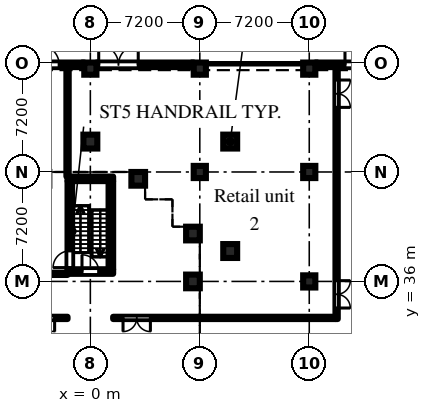
"""IFC4 building model, lengths in metres.
Left out: names, types, materials, properties, quantities, classifications, styles, units other than length and angle.
Written with IfcOpenShell. Run it as: python <this file> out.ifc"""

import sys

from ifc_helpers import new_model, si_unit, direction, frame, frame_2d, origin, origin_2d, place, context, subcontext, project, spatial, rectangle, hollow_circle, extrude, element, fill, save


model = new_model("IFC4")
c1 = context("Model", 3, precision=1e-05, world=origin(), true_north=direction((0.0, 1.0)))
c2 = subcontext(c1, "Body", "Model", "MODEL_VIEW")
j1 = project(units=[si_unit("LENGTHUNIT", "METRE"), si_unit("PLANEANGLEUNIT", "RADIAN")], contexts=[c1])
p1 = place(None, origin())
s1 = spatial("IfcSite", under=j1, at=p1, CompositionType="ELEMENT")
p2 = place(p1, origin())
s2 = spatial("IfcBuilding", under=s1, at=p2, CompositionType="ELEMENT")
p3 = place(p2, origin())
s3 = spatial("IfcBuildingStorey", under=s2, at=p3, CompositionType="ELEMENT", Elevation=0.0)
for number, where, z_axis, x_axis in (
    (1, (3.15, 42.75, 0.0), (0.0, 0.0, 1.0), (1.0, 0.0, 0.0)),
    (2, (6.75, 36.0, 0.0), (0.0, 0.0, 1.0), (1.0, 0.0, 0.0)),
    (3, (6.75, 39.15, 0.0), (0.0, 0.0, 1.0), (1.0, 0.0, 0.0)),
):
    element("IfcColumn", number, at=place(p3, frame(where, z_axis=z_axis, x_axis=x_axis)), inside=s3, PredefinedType="COLUMN", context=c2, shape_type="SweptSolid", body=[
        extrude(rectangle(XDim=0.9, YDim=0.9, at=origin_2d()), origin(), (0.0, 0.0, 1.0), 7.2),
    ])
for number, where, z_axis, x_axis in (
    (4, (0.0, 50.0, 0.0), (0.0, 0.0, 1.0), (1.0, 0.0, 0.0)),
    (5, (7.2, 43.2, 0.0), (0.0, 0.0, 1.0), (1.0, 0.0, 0.0)),
    (6, (7.2, 50.0, 0.0), (0.0, 0.0, 1.0), (1.0, 0.0, 0.0)),
    (7, (14.4, 36.0, 0.0), (0.0, 0.0, 1.0), (1.0, 0.0, 0.0)),
    (8, (14.4, 43.2, 0.0), (0.0, 0.0, 1.0), (1.0, 0.0, 0.0)),
    (9, (14.4, 50.0, 0.0), (0.0, 0.0, 1.0), (1.0, 0.0, 0.0)),
):
    element("IfcColumn", number, at=place(p3, frame(where, z_axis=z_axis, x_axis=x_axis)), inside=s3, PredefinedType="COLUMN", context=c2, shape_type="SweptSolid", body=[
        extrude(rectangle(XDim=0.8, YDim=0.8, at=origin_2d()), origin(), (0.0, 0.0, 1.0), 6.6),
    ])
for number, where, z_axis, x_axis in (
    (10, (9.2, 38.0, 0.0), (0.0, 0.0, 1.0), (1.0, 0.0, 0.0)),
    (11, (9.2, 45.2, 0.0), (0.0, 0.0, 1.0), (1.0, 0.0, 0.0)),
    (12, (0.0, 45.2, 0.0), (0.0, 0.0, 1.0), (1.0, 0.0, 0.0)),
):
    element("IfcColumn", number, at=place(p3, frame(where, z_axis=z_axis, x_axis=x_axis)), inside=s3, PredefinedType="COLUMN", context=c2, shape_type="SweptSolid", body=[
        extrude(hollow_circle(Radius=0.457, WallThickness=0.05, at=origin_2d()), origin(), (0.0, 0.0, 1.0), 7.5),
    ])
p4 = place(p3, frame((21.2, 50.25, 0.0), z_axis=(0.0, 0.0, 1.0), x_axis=(-1.0, 0.0, 0.0)))
e13 = element("IfcWall", 13, at=p4, inside=s3, PredefinedType="SOLIDWALL", context=c2, shape_type="SweptSolid", body=[
    extrude(rectangle(XDim=6.4, YDim=0.3, at=frame_2d((3.2, 0.0))), origin(), (0.0, 0.0, 1.0), 6.6),
])
p5 = place(p4, frame((3.15, 0.0, 0.0)))
e14 = element("IfcOpeningElement", 14, at=p5, cuts=e13, PredefinedType="OPENING", context=c2, shape_type="SweptSolid", body=[
    extrude(rectangle(XDim=1.3, YDim=2.1, at=frame_2d((0.65, 1.05))), frame((0.0, 0.16, 0.0), z_axis=(0.0, -1.0, 0.0), x_axis=(1.0, 0.0, 0.0)), (0.0, 0.0, 1.0), 0.32),
])
p6 = place(p3, frame((6.8, 50.25, 0.0), z_axis=(0.0, 0.0, 1.0), x_axis=(-1.0, 0.0, 0.0)))
e15 = element("IfcWall", 15, at=p6, inside=s3, PredefinedType="SOLIDWALL", context=c2, shape_type="SweptSolid", body=[
    extrude(rectangle(XDim=6.4, YDim=0.3, at=frame_2d((3.2, 0.0))), origin(), (0.0, 0.0, 1.0), 6.6),
])
p7 = place(p6, frame((3.65, 0.0, 0.0)))
e16 = element("IfcOpeningElement", 16, at=p7, cuts=e15, PredefinedType="OPENING", context=c2, shape_type="SweptSolid", body=[
    extrude(rectangle(XDim=2.6, YDim=2.4, at=frame_2d((1.3, 1.2))), frame((0.0, 0.16, 0.0), z_axis=(0.0, -1.0, 0.0), x_axis=(1.0, 0.0, 0.0)), (0.0, 0.0, 1.0), 0.32),
])
p8 = place(p3, frame((-0.4, 50.25, 0.0), z_axis=(0.0, 0.0, 1.0), x_axis=(-1.0, 0.0, 0.0)))
e17 = element("IfcWall", 17, at=p8, inside=s3, PredefinedType="SOLIDWALL", context=c2, shape_type="SweptSolid", body=[
    extrude(rectangle(XDim=6.4, YDim=0.3, at=frame_2d((3.2, 0.0))), origin(), (0.0, 0.0, 1.0), 6.6),
])
p9 = place(p8, frame((1.65, 0.0, 0.0)))
e18 = element("IfcOpeningElement", 18, at=p9, cuts=e17, PredefinedType="OPENING", context=c2, shape_type="SweptSolid", body=[
    extrude(rectangle(XDim=1.3, YDim=2.1, at=frame_2d((0.65, 1.05))), frame((0.0, 0.16, 0.0), z_axis=(0.0, -1.0, 0.0), x_axis=(1.0, 0.0, 0.0)), (0.0, 0.0, 1.0), 0.32),
])
p10 = place(p8, frame((3.65, 0.0, 0.0)))
e19 = element("IfcOpeningElement", 19, at=p10, cuts=e17, PredefinedType="OPENING", context=c2, shape_type="SweptSolid", body=[
    extrude(rectangle(XDim=2.6, YDim=2.4, at=frame_2d((1.3, 1.2))), frame((0.0, 0.16, 0.0), z_axis=(0.0, -1.0, 0.0), x_axis=(1.0, 0.0, 0.0)), (0.0, 0.0, 1.0), 0.32),
])
p11 = place(p3, frame((-1.5, 36.65, 0.0), z_axis=(0.0, 0.0, 1.0), x_axis=(1.0, 0.0, 0.0)))
e20 = element("IfcWall", 20, at=p11, inside=s3, PredefinedType="SHEAR", context=c2, shape_type="SweptSolid", body=[
    extrude(rectangle(XDim=3.0, YDim=0.3, at=frame_2d((1.5, 0.0))), origin(), (0.0, 0.0, 1.0), 6.6),
])
p12 = place(p11, frame((0.95, 0.0, 0.0)))
e21 = element("IfcOpeningElement", 21, at=p12, cuts=e20, PredefinedType="OPENING", context=c2, shape_type="SweptSolid", body=[
    extrude(rectangle(XDim=1.1, YDim=2.1, at=frame_2d((0.55, 1.05))), frame((0.0, 0.16, 0.0), z_axis=(0.0, -1.0, 0.0), x_axis=(1.0, 0.0, 0.0)), (0.0, 0.0, 1.0), 0.32),
])
p13 = place(p3, frame((-1.5, 42.75, 0.0), z_axis=(0.0, 0.0, 1.0), x_axis=(1.0, 0.0, 0.0)))
e22 = element("IfcWall", 22, at=p13, inside=s3, PredefinedType="SHEAR", context=c2, shape_type="SweptSolid", body=[
    extrude(rectangle(XDim=3.0, YDim=0.3, at=frame_2d((1.5, 0.0))), origin(), (0.0, 0.0, 1.0), 6.6),
])
p14 = place(p3, frame((-1.35, 36.8, 0.0), z_axis=(0.0, 0.0, 1.0), x_axis=(0.0, 1.0, 0.0)))
e23 = element("IfcWall", 23, at=p14, inside=s3, PredefinedType="SHEAR", context=c2, shape_type="SweptSolid", body=[
    extrude(rectangle(XDim=5.8, YDim=0.3, at=frame_2d((2.9, 0.0))), origin(), (0.0, 0.0, 1.0), 6.6),
])
p15 = place(p14, frame((0.11, 0.0, 0.0)))
e24 = element("IfcOpeningElement", 24, at=p15, cuts=e23, PredefinedType="OPENING", context=c2, shape_type="SweptSolid", body=[
    extrude(rectangle(XDim=1.1, YDim=2.1, at=frame_2d((0.55, 1.05))), frame((0.0, 0.16, 0.0), z_axis=(0.0, -1.0, 0.0), x_axis=(1.0, 0.0, 0.0)), (0.0, 0.0, 1.0), 0.32),
])
p16 = place(p3, frame((1.35, 36.8, 0.0), z_axis=(0.0, 0.0, 1.0), x_axis=(0.0, 1.0, 0.0)))
e25 = element("IfcWall", 25, at=p16, inside=s3, PredefinedType="SHEAR", context=c2, shape_type="SweptSolid", body=[
    extrude(rectangle(XDim=5.8, YDim=0.3, at=frame_2d((2.9, 0.0))), origin(), (0.0, 0.0, 1.0), 6.6),
])
p17 = place(p3, frame((-16.125, 33.6, 0.0), z_axis=(0.0, 0.0, 1.0), x_axis=(1.0, 0.0, 0.0)))
e26 = element("IfcWall", 26, at=p17, inside=s3, PredefinedType="PARTITIONING", context=c2, shape_type="SweptSolid", body=[
    extrude(rectangle(XDim=14.625, YDim=0.15, at=frame_2d((7.312, 0.0))), origin(), (0.0, 0.0, 1.0), 6.6),
])
p18 = place(p17, frame((0.575, 0.0, 0.0)))
e27 = element("IfcOpeningElement", 27, at=p18, cuts=e26, PredefinedType="OPENING", context=c2, shape_type="SweptSolid", body=[
    extrude(rectangle(XDim=1.8, YDim=2.1, at=frame_2d((0.9, 1.05))), frame((0.0, 0.085, 0.0), z_axis=(0.0, -1.0, 0.0), x_axis=(1.0, 0.0, 0.0)), (0.0, 0.0, 1.0), 0.17),
])
p19 = place(p17, frame((11.975, 0.0, 0.0)))
e28 = element("IfcOpeningElement", 28, at=p19, cuts=e26, PredefinedType="OPENING", context=c2, shape_type="SweptSolid", body=[
    extrude(rectangle(XDim=1.8, YDim=2.1, at=frame_2d((0.9, 1.05))), frame((0.0, 0.085, 0.0), z_axis=(0.0, -1.0, 0.0), x_axis=(1.0, 0.0, 0.0)), (0.0, 0.0, 1.0), 0.17),
])
p20 = place(p3, frame((-3.825, 36.5, 0.0), z_axis=(0.0, 0.0, 1.0), x_axis=(1.0, 0.0, 0.0)))
e29 = element("IfcWall", 29, at=p20, inside=s3, PredefinedType="PARTITIONING", context=c2, shape_type="SweptSolid", body=[
    extrude(rectangle(XDim=2.325, YDim=0.15, at=frame_2d((1.163, 0.0))), origin(), (0.0, 0.0, 1.0), 6.6),
])
p21 = place(p3, frame((-1.5, 42.9, 0.0), z_axis=(0.0, 0.0, 1.0), x_axis=(0.0, 1.0, 0.0)))
e30 = element("IfcWall", 30, at=p21, inside=s3, PredefinedType="PARTITIONING", context=c2, shape_type="SweptSolid", body=[
    extrude(rectangle(XDim=7.32, YDim=0.15, at=frame_2d((3.66, 0.0))), origin(), (0.0, 0.0, 1.0), 6.6),
])
p22 = place(p3, frame((1.5, 33.6, 0.0), z_axis=(0.0, 0.0, 1.0), x_axis=(1.0, 0.0, 0.0)))
e31 = element("IfcWall", 31, at=p22, inside=s3, PredefinedType="PARTITIONING", context=c2, shape_type="SweptSolid", body=[
    extrude(rectangle(XDim=14.625, YDim=0.15, at=frame_2d((7.312, 0.0))), origin(), (0.0, 0.0, 1.0), 6.6),
])
p23 = place(p22, frame((0.65, 0.0, 0.0)))
e32 = element("IfcOpeningElement", 32, at=p23, cuts=e31, PredefinedType="OPENING", context=c2, shape_type="SweptSolid", body=[
    extrude(rectangle(XDim=1.8, YDim=2.1, at=frame_2d((0.9, 1.05))), frame((0.0, 0.085, 0.0), z_axis=(0.0, -1.0, 0.0), x_axis=(1.0, 0.0, 0.0)), (0.0, 0.0, 1.0), 0.17),
])
p24 = place(p3, frame((16.2, 33.525, 0.0), z_axis=(0.0, 0.0, 1.0), x_axis=(0.0, 1.0, 0.0)))
e33 = element("IfcWall", 33, at=p24, inside=s3, PredefinedType="PARTITIONING", context=c2, shape_type="SweptSolid", body=[
    extrude(rectangle(XDim=16.695, YDim=0.15, at=frame_2d((8.348, 0.0))), origin(), (0.0, 0.0, 1.0), 6.6),
])
p25 = place(p24, frame((0.725, 0.0, 0.0)))
e34 = element("IfcOpeningElement", 34, at=p25, cuts=e33, PredefinedType="OPENING", context=c2, shape_type="SweptSolid", body=[
    extrude(rectangle(XDim=1.8, YDim=2.1, at=frame_2d((0.9, 1.05))), frame((0.0, 0.085, 0.0), z_axis=(0.0, -1.0, 0.0), x_axis=(1.0, 0.0, 0.0)), (0.0, 0.0, 1.0), 0.17),
])
p26 = place(p24, frame((13.925, 0.0, 0.0)))
e35 = element("IfcOpeningElement", 35, at=p26, cuts=e33, PredefinedType="OPENING", context=c2, shape_type="SweptSolid", body=[
    extrude(rectangle(XDim=1.8, YDim=2.1, at=frame_2d((0.9, 1.05))), frame((0.0, 0.085, 0.0), z_axis=(0.0, -1.0, 0.0), x_axis=(1.0, 0.0, 0.0)), (0.0, 0.0, 1.0), 0.17),
])
p27 = place(p5, frame((1.3, 0.0, 0.0), z_axis=(0.0, 0.0, 1.0), x_axis=(-1.0, 0.0, 0.0)))
e36 = element("IfcDoor", 36, at=p27, inside=s3, OperationType="SINGLE_SWING_LEFT", PredefinedType="DOOR", context=c2, shape_type="SweptSolid", body=[
    extrude(rectangle(XDim=1.3, YDim=2.1, at=frame_2d((0.65, 1.05))), frame((0.0, 0.025, 0.0), z_axis=(0.0, -1.0, 0.0), x_axis=(1.0, 0.0, 0.0)), (0.0, 0.0, 1.0), 0.05),
])
fill(e14, e36)
p28 = place(p7, frame((2.6, 0.0, 0.0), z_axis=(0.0, 0.0, 1.0), x_axis=(-1.0, 0.0, 0.0)))
e37 = element("IfcDoor", 37, at=p28, inside=s3, OperationType="DOUBLE_DOOR_DOUBLE_SWING", PredefinedType="DOOR", context=c2, shape_type="SweptSolid", body=[
    extrude(rectangle(XDim=2.6, YDim=2.4, at=frame_2d((1.3, 1.2))), frame((0.0, 0.025, 0.0), z_axis=(0.0, -1.0, 0.0), x_axis=(1.0, 0.0, 0.0)), (0.0, 0.0, 1.0), 0.05),
])
fill(e16, e37)
p29 = place(p9, frame((1.3, 0.0, 0.0), z_axis=(0.0, 0.0, 1.0), x_axis=(-1.0, 0.0, 0.0)))
e38 = element("IfcDoor", 38, at=p29, inside=s3, OperationType="SINGLE_SWING_LEFT", PredefinedType="DOOR", context=c2, shape_type="SweptSolid", body=[
    extrude(rectangle(XDim=1.3, YDim=2.1, at=frame_2d((0.65, 1.05))), frame((0.0, 0.025, 0.0), z_axis=(0.0, -1.0, 0.0), x_axis=(1.0, 0.0, 0.0)), (0.0, 0.0, 1.0), 0.05),
])
fill(e18, e38)
p30 = place(p12, origin())
e39 = element("IfcDoor", 39, at=p30, inside=s3, OperationType="SINGLE_SWING_LEFT", PredefinedType="DOOR", context=c2, shape_type="SweptSolid", body=[
    extrude(rectangle(XDim=1.1, YDim=2.1, at=frame_2d((0.55, 1.05))), frame((0.0, 0.025, 0.0), z_axis=(0.0, -1.0, 0.0), x_axis=(1.0, 0.0, 0.0)), (0.0, 0.0, 1.0), 0.05),
])
fill(e21, e39)
p31 = place(p15, origin())
e40 = element("IfcDoor", 40, at=p31, inside=s3, OperationType="SINGLE_SWING_LEFT", PredefinedType="DOOR", context=c2, shape_type="SweptSolid", body=[
    extrude(rectangle(XDim=1.1, YDim=2.1, at=frame_2d((0.55, 1.05))), frame((0.0, 0.025, 0.0), z_axis=(0.0, -1.0, 0.0), x_axis=(1.0, 0.0, 0.0)), (0.0, 0.0, 1.0), 0.05),
])
fill(e24, e40)
p32 = place(p23, frame((1.8, 0.0, 0.0), z_axis=(0.0, 0.0, 1.0), x_axis=(-1.0, 0.0, 0.0)))
e41 = element("IfcDoor", 41, at=p32, inside=s3, OperationType="DOUBLE_DOOR_DOUBLE_SWING", PredefinedType="DOOR", context=c2, shape_type="SweptSolid", body=[
    extrude(rectangle(XDim=1.8, YDim=2.1, at=frame_2d((0.9, 1.05))), frame((0.0, 0.025, 0.0), z_axis=(0.0, -1.0, 0.0), x_axis=(1.0, 0.0, 0.0)), (0.0, 0.0, 1.0), 0.05),
])
fill(e32, e41)
p33 = place(p25, frame((1.8, 0.0, 0.0), z_axis=(0.0, 0.0, 1.0), x_axis=(-1.0, 0.0, 0.0)))
e42 = element("IfcDoor", 42, at=p33, inside=s3, OperationType="DOUBLE_DOOR_DOUBLE_SWING", PredefinedType="DOOR", context=c2, shape_type="SweptSolid", body=[
    extrude(rectangle(XDim=1.8, YDim=2.1, at=frame_2d((0.9, 1.05))), frame((0.0, 0.025, 0.0), z_axis=(0.0, -1.0, 0.0), x_axis=(1.0, 0.0, 0.0)), (0.0, 0.0, 1.0), 0.05),
])
fill(e34, e42)
p34 = place(p26, frame((1.8, 0.0, 0.0), z_axis=(0.0, 0.0, 1.0), x_axis=(-1.0, 0.0, 0.0)))
e43 = element("IfcDoor", 43, at=p34, inside=s3, OperationType="DOUBLE_DOOR_DOUBLE_SWING", PredefinedType="DOOR", context=c2, shape_type="SweptSolid", body=[
    extrude(rectangle(XDim=1.8, YDim=2.1, at=frame_2d((0.9, 1.05))), frame((0.0, 0.025, 0.0), z_axis=(0.0, -1.0, 0.0), x_axis=(1.0, 0.0, 0.0)), (0.0, 0.0, 1.0), 0.05),
])
fill(e35, e43)
p35 = place(p19, frame((1.8, 0.0, 0.0), z_axis=(0.0, 0.0, 1.0), x_axis=(-1.0, 0.0, 0.0)))
e44 = element("IfcDoor", 44, at=p35, inside=s3, OperationType="DOUBLE_DOOR_DOUBLE_SWING", PredefinedType="DOOR", context=c2, shape_type="SweptSolid", body=[
    extrude(rectangle(XDim=1.8, YDim=2.1, at=frame_2d((0.9, 1.05))), frame((0.0, 0.025, 0.0), z_axis=(0.0, -1.0, 0.0), x_axis=(1.0, 0.0, 0.0)), (0.0, 0.0, 1.0), 0.05),
])
fill(e28, e44)
save(model, sys.argv[1])
